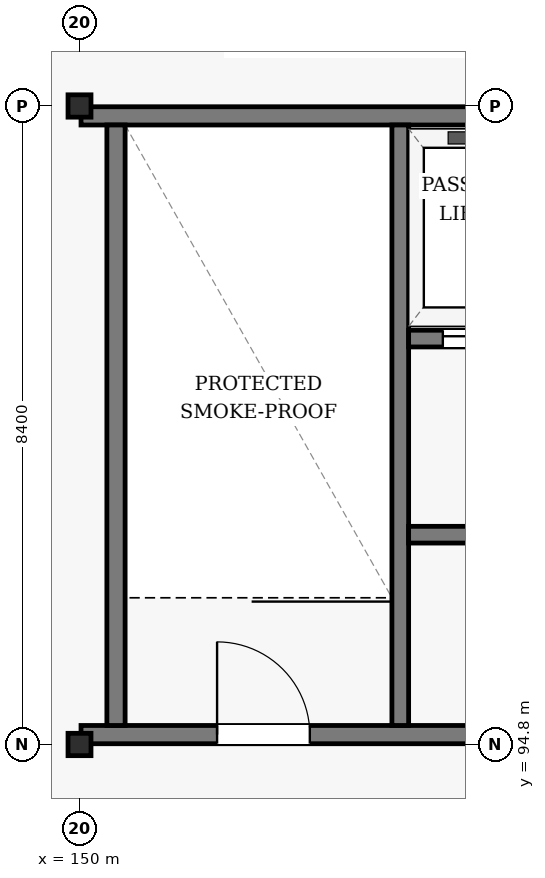
"""IFC4 building model, lengths in metres.
Left out: names, types, materials, properties, quantities, classifications, styles, units other than length and angle.
Written with IfcOpenShell. Run it as: python <this file> out.ifc"""

import sys

from ifc_helpers import new_model, si_unit, direction, frame, frame_2d, origin, origin_2d, place, context, subcontext, project, spatial, rectangle, i_section, extrude, element, fill, save


model = new_model("IFC4")
c1 = context("Model", 3, precision=1e-05, world=origin(), true_north=direction((0.0, 1.0)))
c2 = subcontext(c1, "Body", "Model", "MODEL_VIEW")
j1 = project(units=[si_unit("LENGTHUNIT", "METRE"), si_unit("PLANEANGLEUNIT", "RADIAN")], contexts=[c1])
p1 = place(None, origin())
s1 = spatial("IfcSite", under=j1, at=p1, CompositionType="ELEMENT")
p2 = place(p1, origin())
s2 = spatial("IfcBuilding", under=s1, at=p2, CompositionType="ELEMENT")
p3 = place(p2, frame((0.0, 0.0, 61.2)))
s3 = spatial("IfcBuildingStorey", under=s2, at=p3, CompositionType="ELEMENT", Elevation=61.2)
for number, where, z_axis, x_axis in (
    (1, (150.0, 94.8, 0.0), (0.0, 0.0, 1.0), (1.0, 0.0, 0.0)),
    (2, (150.0, 103.2, 0.0), (0.0, 0.0, 1.0), (1.0, 0.0, 0.0)),
):
    element("IfcColumn", number, at=place(p3, frame(where, z_axis=z_axis, x_axis=x_axis)), inside=s3, PredefinedType="COLUMN", context=c2, shape_type="SweptSolid", body=[
        extrude(i_section(OverallWidth=0.302, OverallDepth=0.294, WebThickness=0.012, FlangeThickness=0.012, FilletRadius=0.018, at=origin_2d()), origin(), (0.0, 0.0, 1.0), 4.2),
    ])
p4 = place(p3, frame((150.02, 94.93, 0.0), z_axis=(0.0, 0.0, 1.0), x_axis=(1.0, 0.0, 0.0)))
e3 = element("IfcWall", 3, at=p4, inside=s3, PredefinedType="SHEAR", context=c2, shape_type="SweptSolid", body=[
    extrude(rectangle(XDim=8.77, YDim=0.24, at=frame_2d((4.385, 0.0))), origin(), (0.0, 0.0, 1.0), 3.96),
])
p5 = place(p4, frame((1.79, 0.0, 0.0)))
e4 = element("IfcOpeningElement", 4, at=p5, cuts=e3, PredefinedType="OPENING", context=c2, shape_type="SweptSolid", body=[
    extrude(rectangle(XDim=1.22, YDim=2.18, at=frame_2d((0.61, 1.09))), frame((0.0, 0.13, 0.0), z_axis=(0.0, -1.0, 0.0), x_axis=(1.0, 0.0, 0.0)), (0.0, 0.0, 1.0), 0.26),
])
p6 = place(p3, frame((150.02, 103.07, 0.0), z_axis=(0.0, 0.0, 1.0), x_axis=(1.0, 0.0, 0.0)))
e5 = element("IfcWall", 5, at=p6, inside=s3, PredefinedType="SHEAR", context=c2, shape_type="SweptSolid", body=[
    extrude(rectangle(XDim=8.77, YDim=0.24, at=frame_2d((4.385, 0.0))), origin(), (0.0, 0.0, 1.0), 3.96),
])
p7 = place(p3, frame((150.48, 95.05, 0.0), z_axis=(0.0, 0.0, 1.0), x_axis=(0.0, 1.0, 0.0)))
e6 = element("IfcWall", 6, at=p7, inside=s3, PredefinedType="SHEAR", context=c2, shape_type="SweptSolid", body=[
    extrude(rectangle(XDim=7.9, YDim=0.24, at=frame_2d((3.95, 0.0))), origin(), (0.0, 0.0, 1.0), 3.96),
])
p8 = place(p3, frame((154.22, 95.05, 0.0), z_axis=(0.0, 0.0, 1.0), x_axis=(0.0, 1.0, 0.0)))
e7 = element("IfcWall", 7, at=p8, inside=s3, PredefinedType="SHEAR", context=c2, shape_type="SweptSolid", body=[
    extrude(rectangle(XDim=7.9, YDim=0.22, at=frame_2d((3.95, 0.0))), origin(), (0.0, 0.0, 1.0), 3.96),
])
p9 = place(p3, frame((154.33, 100.14, 0.0), z_axis=(0.0, 0.0, 1.0), x_axis=(1.0, 0.0, 0.0)))
e8 = element("IfcWall", 8, at=p9, inside=s3, PredefinedType="SHEAR", context=c2, shape_type="SweptSolid", body=[
    extrude(rectangle(XDim=2.0, YDim=0.22, at=frame_2d((1.0, 0.0))), origin(), (0.0, 0.0, 1.0), 3.96),
])
p10 = place(p9, frame((0.45, 0.0, 0.0)))
e9 = element("IfcOpeningElement", 9, at=p10, cuts=e8, PredefinedType="OPENING", context=c2, shape_type="SweptSolid", body=[
    extrude(rectangle(XDim=1.1, YDim=2.15, at=frame_2d((0.55, 1.075))), frame((0.0, 0.12, 0.0), z_axis=(0.0, -1.0, 0.0), x_axis=(1.0, 0.0, 0.0)), (0.0, 0.0, 1.0), 0.24),
])
p11 = place(p3, frame((154.33, 97.56, 0.0), z_axis=(0.0, 0.0, 1.0), x_axis=(1.0, 0.0, 0.0)))
e10 = element("IfcWall", 10, at=p11, inside=s3, PredefinedType="SHEAR", context=c2, shape_type="SweptSolid", body=[
    extrude(rectangle(XDim=2.0, YDim=0.22, at=frame_2d((1.0, 0.0))), origin(), (0.0, 0.0, 1.0), 3.96),
])
p12 = place(p5, origin())
e11 = element("IfcDoor", 11, at=p12, inside=s3, OperationType="SINGLE_SWING_LEFT", PredefinedType="DOOR", context=c2, shape_type="SweptSolid", body=[
    extrude(rectangle(XDim=1.22, YDim=2.18, at=frame_2d((0.61, 1.09))), frame((0.0, 0.025, 0.0), z_axis=(0.0, -1.0, 0.0), x_axis=(1.0, 0.0, 0.0)), (0.0, 0.0, 1.0), 0.05),
])
fill(e4, e11)
p13 = place(p10, origin())
e12 = element("IfcDoor", 12, at=p13, inside=s3, OperationType="SLIDING_TO_LEFT", PredefinedType="DOOR", context=c2, shape_type="SweptSolid", body=[
    extrude(rectangle(XDim=1.1, YDim=2.15, at=frame_2d((0.55, 1.075))), frame((0.0, 0.025, 0.0), z_axis=(0.0, -1.0, 0.0), x_axis=(1.0, 0.0, 0.0)), (0.0, 0.0, 1.0), 0.05),
])
fill(e9, e12)
save(model, sys.argv[1])
